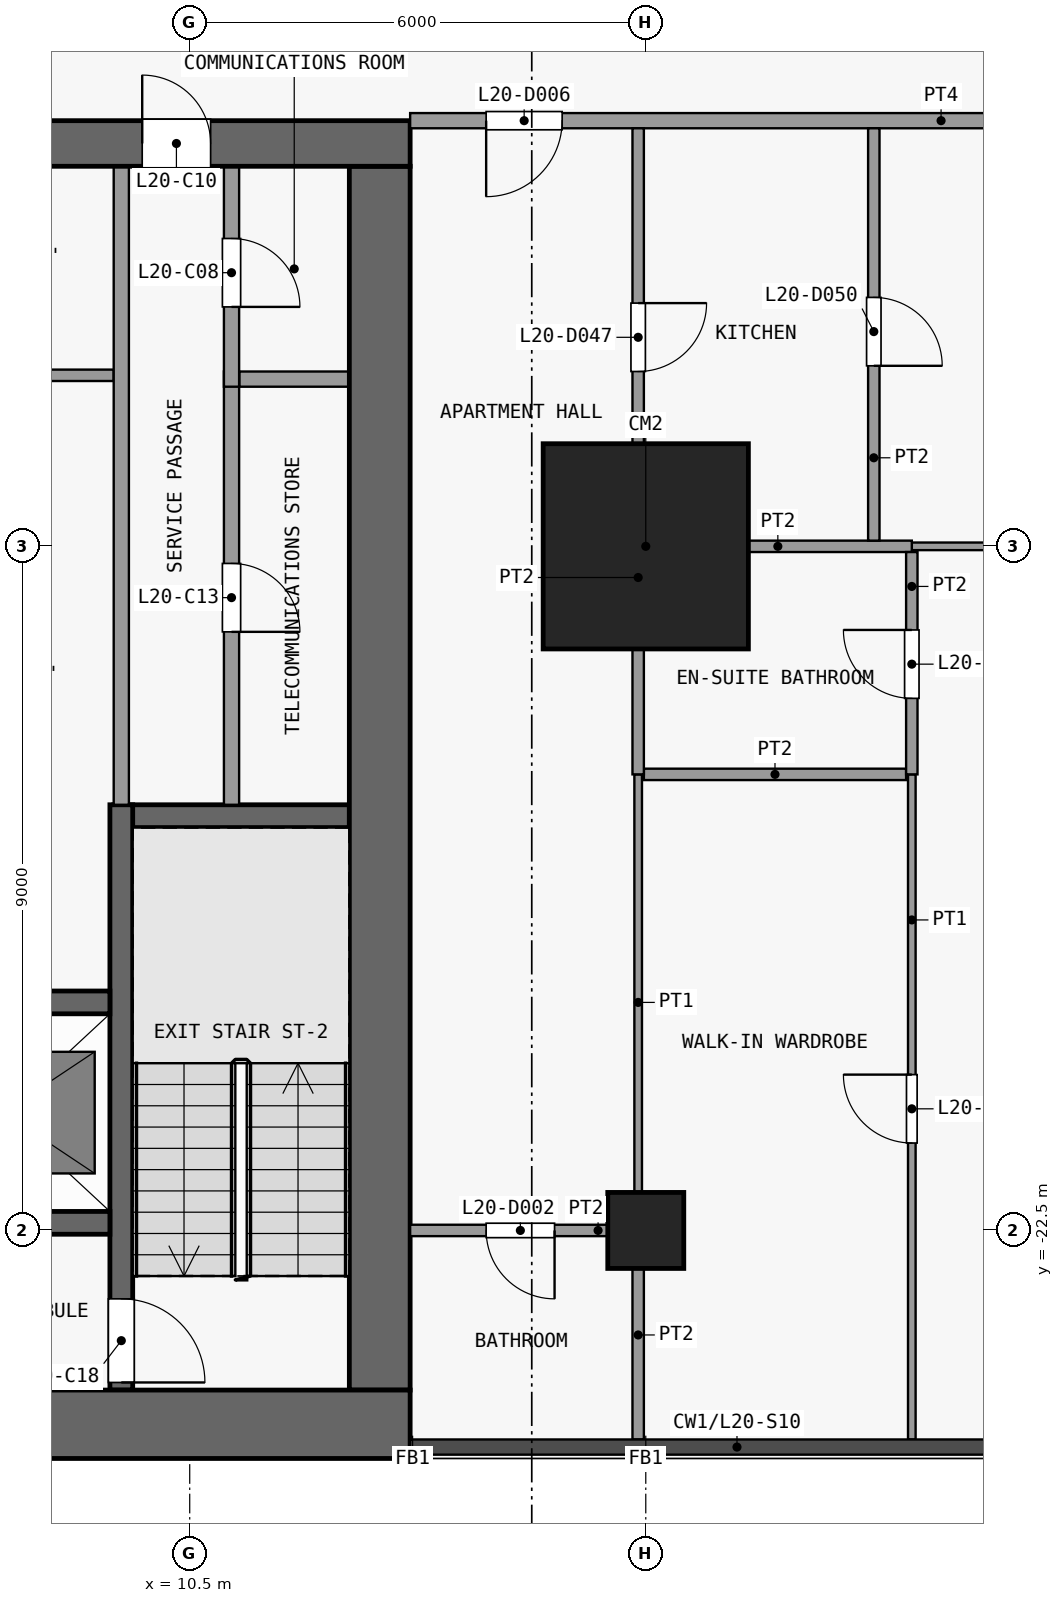
"""IFC4 building model, lengths in metres.
Left out: names, types, materials, properties, quantities, classifications, styles, units other than length and angle.
Written with IfcOpenShell. Run it as: python <this file> out.ifc"""

import sys

from ifc_helpers import new_model, si_unit, direction, frame, frame_2d, origin, origin_2d, place, context, subcontext, project, spatial, rectangle, extrude, element, fill, save


model = new_model("IFC4")
c1 = context("Model", 3, precision=1e-05, world=origin(), true_north=direction((0.0, 1.0)))
c2 = subcontext(c1, "Body", "Model", "MODEL_VIEW")
j1 = project(units=[si_unit("LENGTHUNIT", "METRE"), si_unit("PLANEANGLEUNIT", "RADIAN")], contexts=[c1])
p1 = place(None, origin())
s1 = spatial("IfcSite", under=j1, at=p1, CompositionType="ELEMENT")
p2 = place(p1, origin())
s2 = spatial("IfcBuilding", under=s1, at=p2, CompositionType="ELEMENT")
p3 = place(p2, frame((0.0, 0.0, 84.7)))
s3 = spatial("IfcBuildingStorey", under=s2, at=p3, CompositionType="ELEMENT", Elevation=84.7)
p4 = place(p3, frame((16.5, -22.5, 0.0), z_axis=(0.0, 0.0, 1.0), x_axis=(1.0, 0.0, 0.0)))
e1 = element("IfcColumn", 1, at=p4, inside=s3, PredefinedType="COLUMN", context=c2, shape_type="SweptSolid", body=[
    extrude(rectangle(XDim=1.0, YDim=1.0, at=origin_2d()), origin(), (0.0, 0.0, 1.0), 3.6),
])
p5 = place(p3, frame((16.5, -13.5, 0.0), z_axis=(0.0, 0.0, 1.0), x_axis=(1.0, 0.0, 0.0)))
e2 = element("IfcColumn", 2, at=p5, inside=s3, PredefinedType="COLUMN", context=c2, shape_type="SweptSolid", body=[
    extrude(rectangle(XDim=2.7, YDim=2.7, at=origin_2d()), origin(), (0.0, 0.0, 1.0), 3.6),
])
p6 = place(p3, frame((-13.4, -25.05, 0.0), z_axis=(0.0, 0.0, 1.0), x_axis=(1.0, 0.0, 0.0)))
e3 = element("IfcWall", 3, at=p6, inside=s3, PredefinedType="SHEAR", context=c2, shape_type="SweptSolid", body=[
    extrude(rectangle(XDim=26.8, YDim=0.9, at=frame_2d((13.4, 0.0))), origin(), (0.0, 0.0, 1.0), 3.3),
])
p7 = place(p3, frame((-13.4, -8.2, 0.0), z_axis=(0.0, 0.0, 1.0), x_axis=(1.0, 0.0, 0.0)))
e4 = element("IfcWall", 4, at=p7, inside=s3, PredefinedType="SHEAR", context=c2, shape_type="SweptSolid", body=[
    extrude(rectangle(XDim=26.8, YDim=0.6, at=frame_2d((13.4, 0.0))), origin(), (0.0, 0.0, 1.0), 3.3),
])
p8 = place(p7, frame((7.7, 0.0, 0.0)))
e5 = element("IfcOpeningElement", 5, at=p8, cuts=e4, PredefinedType="OPENING", context=c2, shape_type="SweptSolid", body=[
    extrude(rectangle(XDim=1.8, YDim=2.1, at=frame_2d((0.9, 1.05))), frame((0.0, 0.31, 0.0), z_axis=(0.0, -1.0, 0.0), x_axis=(1.0, 0.0, 0.0)), (0.0, 0.0, 1.0), 0.62),
])
p9 = place(p7, frame((17.3, 0.0, 0.0)))
e6 = element("IfcOpeningElement", 6, at=p9, cuts=e4, PredefinedType="OPENING", context=c2, shape_type="SweptSolid", body=[
    extrude(rectangle(XDim=1.8, YDim=2.1, at=frame_2d((0.9, 1.05))), frame((0.0, 0.31, 0.0), z_axis=(0.0, -1.0, 0.0), x_axis=(1.0, 0.0, 0.0)), (0.0, 0.0, 1.0), 0.62),
])
p10 = place(p7, frame((2.625, 0.0, 0.0)))
e7 = element("IfcOpeningElement", 7, at=p10, cuts=e4, PredefinedType="OPENING", context=c2, shape_type="SweptSolid", body=[
    extrude(rectangle(XDim=0.9, YDim=2.1, at=frame_2d((0.45, 1.05))), frame((0.0, 0.31, 0.0), z_axis=(0.0, -1.0, 0.0), x_axis=(1.0, 0.0, 0.0)), (0.0, 0.0, 1.0), 0.62),
])
p11 = place(p7, frame((23.275, 0.0, 0.0)))
e8 = element("IfcOpeningElement", 8, at=p11, cuts=e4, PredefinedType="OPENING", context=c2, shape_type="SweptSolid", body=[
    extrude(rectangle(XDim=0.9, YDim=2.1, at=frame_2d((0.45, 1.05))), frame((0.0, 0.31, 0.0), z_axis=(0.0, -1.0, 0.0), x_axis=(1.0, 0.0, 0.0)), (0.0, 0.0, 1.0), 0.62),
])
p12 = place(p3, frame((13.0, -24.6, 0.0), z_axis=(0.0, 0.0, 1.0), x_axis=(0.0, 1.0, 0.0)))
e9 = element("IfcWall", 9, at=p12, inside=s3, PredefinedType="SHEAR", context=c2, shape_type="SweptSolid", body=[
    extrude(rectangle(XDim=16.1, YDim=0.8, at=frame_2d((8.05, 0.0))), origin(), (0.0, 0.0, 1.0), 3.3),
])
p13 = place(p3, frame((6.35, -22.4, 0.0), z_axis=(0.0, 0.0, 1.0), x_axis=(1.0, 0.0, 0.0)))
e10 = element("IfcWall", 10, at=p13, inside=s3, PredefinedType="SHEAR", context=c2, shape_type="SweptSolid", body=[
    extrude(rectangle(XDim=3.1, YDim=0.3, at=frame_2d((1.55, 0.0))), origin(), (0.0, 0.0, 1.0), 3.3),
])
p14 = place(p3, frame((6.425, -19.5, 0.0), z_axis=(0.0, 0.0, 1.0), x_axis=(1.0, 0.0, 0.0)))
e11 = element("IfcWall", 11, at=p14, inside=s3, PredefinedType="SHEAR", context=c2, shape_type="SweptSolid", body=[
    extrude(rectangle(XDim=3.025, YDim=0.3, at=frame_2d((1.512, 0.0))), origin(), (0.0, 0.0, 1.0), 3.3),
])
p15 = place(p3, frame((9.5, -17.05, 0.0), z_axis=(0.0, 0.0, 1.0), x_axis=(1.0, 0.0, 0.0)))
e12 = element("IfcWall", 12, at=p15, inside=s3, PredefinedType="SHEAR", context=c2, shape_type="SweptSolid", body=[
    extrude(rectangle(XDim=3.1, YDim=0.3, at=frame_2d((1.55, 0.0))), origin(), (0.0, 0.0, 1.0), 3.3),
])
p16 = place(p3, frame((11.15, -11.3, 0.0), z_axis=(0.0, 0.0, 1.0), x_axis=(1.0, 0.0, 0.0)))
e13 = element("IfcWall", 13, at=p16, inside=s3, PredefinedType="PARTITIONING", context=c2, shape_type="SweptSolid", body=[
    extrude(rectangle(XDim=1.45, YDim=0.2, at=frame_2d((0.725, 0.0))), origin(), (0.0, 0.0, 1.0), 3.3),
])
p17 = place(p3, frame((6.575, -11.25, 0.0), z_axis=(0.0, 0.0, 1.0), x_axis=(1.0, 0.0, 0.0)))
e14 = element("IfcWall", 14, at=p17, inside=s3, PredefinedType="PARTITIONING", context=c2, shape_type="SweptSolid", body=[
    extrude(rectangle(XDim=2.925, YDim=0.15, at=frame_2d((1.462, 0.0))), origin(), (0.0, 0.0, 1.0), 3.3),
])
p18 = place(p3, frame((9.6, -16.9, 0.0), z_axis=(0.0, 0.0, 1.0), x_axis=(0.0, -1.0, 0.0)))
e15 = element("IfcWall", 15, at=p18, inside=s3, PredefinedType="SHEAR", context=c2, shape_type="SweptSolid", body=[
    extrude(rectangle(XDim=7.7, YDim=0.3, at=frame_2d((3.85, 0.0))), origin(), (0.0, 0.0, 1.0), 3.3),
])
p19 = place(p18, frame((6.5, 0.0, 0.0)))
e16 = element("IfcOpeningElement", 16, at=p19, cuts=e15, PredefinedType="OPENING", context=c2, shape_type="SweptSolid", body=[
    extrude(rectangle(XDim=1.1, YDim=2.1, at=frame_2d((0.55, 1.05))), frame((0.0, 0.16, 0.0), z_axis=(0.0, -1.0, 0.0), x_axis=(1.0, 0.0, 0.0)), (0.0, 0.0, 1.0), 0.32),
])
p20 = place(p3, frame((9.6, -16.9, 0.0), z_axis=(0.0, 0.0, 1.0), x_axis=(0.0, 1.0, 0.0)))
e17 = element("IfcWall", 17, at=p20, inside=s3, PredefinedType="PARTITIONING", context=c2, shape_type="SweptSolid", body=[
    extrude(rectangle(XDim=8.4, YDim=0.2, at=frame_2d((4.2, 0.0))), origin(), (0.0, 0.0, 1.0), 3.3),
])
p21 = place(p3, frame((11.05, -11.2, 0.0), z_axis=(0.0, 0.0, 1.0), x_axis=(0.0, -1.0, 0.0)))
e18 = element("IfcWall", 18, at=p21, inside=s3, PredefinedType="PARTITIONING", context=c2, shape_type="SweptSolid", body=[
    extrude(rectangle(XDim=5.7, YDim=0.2, at=frame_2d((2.85, 0.0))), origin(), (0.0, 0.0, 1.0), 3.3),
])
p22 = place(p21, frame((2.525, 0.0, 0.0)))
e19 = element("IfcOpeningElement", 19, at=p22, cuts=e18, PredefinedType="OPENING", context=c2, shape_type="SweptSolid", body=[
    extrude(rectangle(XDim=0.9, YDim=2.1, at=frame_2d((0.45, 1.05))), frame((0.0, 0.11, 0.0), z_axis=(0.0, -1.0, 0.0), x_axis=(1.0, 0.0, 0.0)), (0.0, 0.0, 1.0), 0.22),
])
p23 = place(p3, frame((11.05, -8.5, 0.0), z_axis=(0.0, 0.0, 1.0), x_axis=(0.0, -1.0, 0.0)))
e20 = element("IfcWall", 20, at=p23, inside=s3, PredefinedType="PARTITIONING", context=c2, shape_type="SweptSolid", body=[
    extrude(rectangle(XDim=2.9, YDim=0.2, at=frame_2d((1.45, 0.0))), origin(), (0.0, 0.0, 1.0), 3.3),
])
p24 = place(p23, frame((0.95, 0.0, 0.0)))
e21 = element("IfcOpeningElement", 21, at=p24, cuts=e20, PredefinedType="OPENING", context=c2, shape_type="SweptSolid", body=[
    extrude(rectangle(XDim=0.9, YDim=2.1, at=frame_2d((0.45, 1.05))), frame((0.0, 0.11, 0.0), z_axis=(0.0, -1.0, 0.0), x_axis=(1.0, 0.0, 0.0)), (0.0, 0.0, 1.0), 0.22),
])
p25 = place(p3, frame((13.4, -22.5, 0.0), z_axis=(0.0, 0.0, 1.0), x_axis=(1.0, 0.0, 0.0)))
e22 = element("IfcWall", 22, at=p25, inside=s3, PredefinedType="PARTITIONING", context=c2, shape_type="SweptSolid", body=[
    extrude(rectangle(XDim=2.925, YDim=0.15, at=frame_2d((1.462, 0.0))), origin(), (0.0, 0.0, 1.0), 3.3),
])
p26 = place(p25, frame((1.0, 0.0, 0.0)))
e23 = element("IfcOpeningElement", 23, at=p26, cuts=e22, PredefinedType="OPENING", context=c2, shape_type="SweptSolid", body=[
    extrude(rectangle(XDim=0.9, YDim=2.1, at=frame_2d((0.45, 1.05))), frame((0.0, 0.085, 0.0), z_axis=(0.0, -1.0, 0.0), x_axis=(1.0, 0.0, 0.0)), (0.0, 0.0, 1.0), 0.17),
])
p27 = place(p3, frame((16.475, -16.5, 0.0), z_axis=(0.0, 0.0, 1.0), x_axis=(1.0, 0.0, 0.0)))
e24 = element("IfcWall", 24, at=p27, inside=s3, PredefinedType="PARTITIONING", context=c2, shape_type="SweptSolid", body=[
    extrude(rectangle(XDim=3.45, YDim=0.15, at=frame_2d((1.725, 0.0))), origin(), (0.0, 0.0, 1.0), 3.3),
])
p28 = place(p3, frame((20.0, -13.5, 0.0), z_axis=(0.0, 0.0, 1.0), x_axis=(1.0, 0.0, 0.0)))
e25 = element("IfcWall", 25, at=p28, inside=s3, PredefinedType="PARTITIONING", context=c2, shape_type="SweptSolid", body=[
    extrude(rectangle(XDim=5.25, YDim=0.1, at=frame_2d((2.625, 0.0))), origin(), (0.0, 0.0, 1.0), 3.3),
])
p29 = place(p28, frame((3.1, 0.0, 0.0)))
e26 = element("IfcOpeningElement", 26, at=p29, cuts=e25, PredefinedType="OPENING", context=c2, shape_type="SweptSolid", body=[
    extrude(rectangle(XDim=0.9, YDim=2.1, at=frame_2d((0.45, 1.05))), frame((0.0, 0.06, 0.0), z_axis=(0.0, -1.0, 0.0), x_axis=(1.0, 0.0, 0.0)), (0.0, 0.0, 1.0), 0.12),
])
p30 = place(p3, frame((16.475, -13.5, 0.0), z_axis=(0.0, 0.0, 1.0), x_axis=(1.0, 0.0, 0.0)))
e27 = element("IfcWall", 27, at=p30, inside=s3, PredefinedType="PARTITIONING", context=c2, shape_type="SweptSolid", body=[
    extrude(rectangle(XDim=3.525, YDim=0.15, at=frame_2d((1.762, 0.0))), origin(), (0.0, 0.0, 1.0), 3.3),
])
p31 = place(p3, frame((13.4, -7.9, 0.0), z_axis=(0.0, 0.0, 1.0), x_axis=(1.0, 0.0, 0.0)))
e28 = element("IfcWall", 28, at=p31, inside=s3, PredefinedType="PARTITIONING", context=c2, shape_type="SweptSolid", body=[
    extrude(rectangle(XDim=11.85, YDim=0.2, at=frame_2d((5.925, 0.0))), origin(), (0.0, 0.0, 1.0), 3.3),
])
p32 = place(p31, frame((1.0, 0.0, 0.0)))
e29 = element("IfcOpeningElement", 29, at=p32, cuts=e28, PredefinedType="OPENING", context=c2, shape_type="SweptSolid", body=[
    extrude(rectangle(XDim=1.0, YDim=2.1, at=frame_2d((0.5, 1.05))), frame((0.0, 0.11, 0.0), z_axis=(0.0, -1.0, 0.0), x_axis=(1.0, 0.0, 0.0)), (0.0, 0.0, 1.0), 0.22),
])
p33 = place(p3, frame((16.4, -22.5, 0.0), z_axis=(0.0, 0.0, 1.0), x_axis=(0.0, 1.0, 0.0)))
e30 = element("IfcWall", 30, at=p33, inside=s3, PredefinedType="PARTITIONING", context=c2, shape_type="SweptSolid", body=[
    extrude(rectangle(XDim=6.0, YDim=0.1, at=frame_2d((3.0, 0.0))), origin(), (0.0, 0.0, 1.0), 3.3),
])
p34 = place(p3, frame((16.4, -25.25, 0.0), z_axis=(0.0, 0.0, 1.0), x_axis=(0.0, 1.0, 0.0)))
e31 = element("IfcWall", 31, at=p34, inside=s3, PredefinedType="PARTITIONING", context=c2, shape_type="SweptSolid", body=[
    extrude(rectangle(XDim=2.75, YDim=0.15, at=frame_2d((1.375, 0.0))), origin(), (0.0, 0.0, 1.0), 3.3),
])
p35 = place(p3, frame((16.4, -16.5, 0.0), z_axis=(0.0, 0.0, 1.0), x_axis=(0.0, 1.0, 0.0)))
e32 = element("IfcWall", 32, at=p35, inside=s3, PredefinedType="PARTITIONING", context=c2, shape_type="SweptSolid", body=[
    extrude(rectangle(XDim=8.5, YDim=0.15, at=frame_2d((4.25, 0.0))), origin(), (0.0, 0.0, 1.0), 3.3),
])
p36 = place(p35, frame((5.3, 0.0, 0.0)))
e33 = element("IfcOpeningElement", 33, at=p36, cuts=e32, PredefinedType="OPENING", context=c2, shape_type="SweptSolid", body=[
    extrude(rectangle(XDim=0.9, YDim=2.1, at=frame_2d((0.45, 1.05))), frame((0.0, 0.085, 0.0), z_axis=(0.0, -1.0, 0.0), x_axis=(1.0, 0.0, 0.0)), (0.0, 0.0, 1.0), 0.17),
])
p37 = place(p3, frame((19.5, -13.425, 0.0), z_axis=(0.0, 0.0, 1.0), x_axis=(0.0, 1.0, 0.0)))
e34 = element("IfcWall", 34, at=p37, inside=s3, PredefinedType="PARTITIONING", context=c2, shape_type="SweptSolid", body=[
    extrude(rectangle(XDim=5.425, YDim=0.15, at=frame_2d((2.712, 0.0))), origin(), (0.0, 0.0, 1.0), 3.3),
])
p38 = place(p37, frame((2.3, 0.0, 0.0)))
e35 = element("IfcOpeningElement", 35, at=p38, cuts=e34, PredefinedType="OPENING", context=c2, shape_type="SweptSolid", body=[
    extrude(rectangle(XDim=0.9, YDim=2.1, at=frame_2d((0.45, 1.05))), frame((0.0, 0.085, 0.0), z_axis=(0.0, -1.0, 0.0), x_axis=(1.0, 0.0, 0.0)), (0.0, 0.0, 1.0), 0.17),
])
p39 = place(p3, frame((20.0, -25.25, 0.0), z_axis=(0.0, 0.0, 1.0), x_axis=(0.0, 1.0, 0.0)))
e36 = element("IfcWall", 36, at=p39, inside=s3, PredefinedType="PARTITIONING", context=c2, shape_type="SweptSolid", body=[
    extrude(rectangle(XDim=8.75, YDim=0.1, at=frame_2d((4.375, 0.0))), origin(), (0.0, 0.0, 1.0), 3.3),
])
p40 = place(p39, frame((3.9, 0.0, 0.0)))
e37 = element("IfcOpeningElement", 37, at=p40, cuts=e36, PredefinedType="OPENING", context=c2, shape_type="SweptSolid", body=[
    extrude(rectangle(XDim=0.9, YDim=2.1, at=frame_2d((0.45, 1.05))), frame((0.0, 0.06, 0.0), z_axis=(0.0, -1.0, 0.0), x_axis=(1.0, 0.0, 0.0)), (0.0, 0.0, 1.0), 0.12),
])
p41 = place(p3, frame((20.0, -16.5, 0.0), z_axis=(0.0, 0.0, 1.0), x_axis=(0.0, 1.0, 0.0)))
e38 = element("IfcWall", 38, at=p41, inside=s3, PredefinedType="PARTITIONING", context=c2, shape_type="SweptSolid", body=[
    extrude(rectangle(XDim=2.925, YDim=0.15, at=frame_2d((1.462, 0.0))), origin(), (0.0, 0.0, 1.0), 3.3),
])
p42 = place(p41, frame((1.0, 0.0, 0.0)))
e39 = element("IfcOpeningElement", 39, at=p42, cuts=e38, PredefinedType="OPENING", context=c2, shape_type="SweptSolid", body=[
    extrude(rectangle(XDim=0.9, YDim=2.1, at=frame_2d((0.45, 1.05))), frame((0.0, 0.085, 0.0), z_axis=(0.0, -1.0, 0.0), x_axis=(1.0, 0.0, 0.0)), (0.0, 0.0, 1.0), 0.17),
])
p43 = place(p24, origin())
e40 = element("IfcDoor", 40, at=p43, inside=s3, OperationType="SINGLE_SWING_RIGHT", PredefinedType="DOOR", context=c2, shape_type="SweptSolid", body=[
    extrude(rectangle(XDim=0.9, YDim=2.1, at=frame_2d((0.45, 1.05))), frame((0.0, 0.025, 0.0), z_axis=(0.0, -1.0, 0.0), x_axis=(1.0, 0.0, 0.0)), (0.0, 0.0, 1.0), 0.05),
])
fill(e21, e40)
p44 = place(p11, origin())
e41 = element("IfcDoor", 41, at=p44, inside=s3, OperationType="SINGLE_SWING_LEFT", PredefinedType="DOOR", context=c2, shape_type="SweptSolid", body=[
    extrude(rectangle(XDim=0.9, YDim=2.1, at=frame_2d((0.45, 1.05))), frame((0.0, 0.025, 0.0), z_axis=(0.0, -1.0, 0.0), x_axis=(1.0, 0.0, 0.0)), (0.0, 0.0, 1.0), 0.05),
])
fill(e8, e41)
p45 = place(p22, origin())
e42 = element("IfcDoor", 42, at=p45, inside=s3, OperationType="SINGLE_SWING_RIGHT", PredefinedType="DOOR", context=c2, shape_type="SweptSolid", body=[
    extrude(rectangle(XDim=0.9, YDim=2.1, at=frame_2d((0.45, 1.05))), frame((0.0, 0.025, 0.0), z_axis=(0.0, -1.0, 0.0), x_axis=(1.0, 0.0, 0.0)), (0.0, 0.0, 1.0), 0.05),
])
fill(e19, e42)
p46 = place(p19, origin())
e43 = element("IfcDoor", 43, at=p46, inside=s3, OperationType="SINGLE_SWING_RIGHT", PredefinedType="DOOR", context=c2, shape_type="SweptSolid", body=[
    extrude(rectangle(XDim=1.1, YDim=2.1, at=frame_2d((0.55, 1.05))), frame((0.0, 0.025, 0.0), z_axis=(0.0, -1.0, 0.0), x_axis=(1.0, 0.0, 0.0)), (0.0, 0.0, 1.0), 0.05),
])
fill(e16, e43)
p47 = place(p26, origin())
e44 = element("IfcDoor", 44, at=p47, inside=s3, OperationType="SINGLE_SWING_RIGHT", PredefinedType="DOOR", context=c2, shape_type="SweptSolid", body=[
    extrude(rectangle(XDim=0.9, YDim=2.1, at=frame_2d((0.45, 1.05))), frame((0.0, 0.025, 0.0), z_axis=(0.0, -1.0, 0.0), x_axis=(1.0, 0.0, 0.0)), (0.0, 0.0, 1.0), 0.05),
])
fill(e23, e44)
p48 = place(p32, origin())
e45 = element("IfcDoor", 45, at=p48, inside=s3, OperationType="SINGLE_SWING_LEFT", PredefinedType="DOOR", context=c2, shape_type="SweptSolid", body=[
    extrude(rectangle(XDim=1.0, YDim=2.1, at=frame_2d((0.5, 1.05))), frame((0.0, 0.025, 0.0), z_axis=(0.0, -1.0, 0.0), x_axis=(1.0, 0.0, 0.0)), (0.0, 0.0, 1.0), 0.05),
])
fill(e29, e45)
p49 = place(p36, origin())
e46 = element("IfcDoor", 46, at=p49, inside=s3, OperationType="SINGLE_SWING_RIGHT", PredefinedType="DOOR", context=c2, shape_type="SweptSolid", body=[
    extrude(rectangle(XDim=0.9, YDim=2.1, at=frame_2d((0.45, 1.05))), frame((0.0, 0.025, 0.0), z_axis=(0.0, -1.0, 0.0), x_axis=(1.0, 0.0, 0.0)), (0.0, 0.0, 1.0), 0.05),
])
fill(e33, e46)
p50 = place(p38, origin())
e47 = element("IfcDoor", 47, at=p50, inside=s3, OperationType="SINGLE_SWING_LEFT", PredefinedType="DOOR", context=c2, shape_type="SweptSolid", body=[
    extrude(rectangle(XDim=0.9, YDim=2.1, at=frame_2d((0.45, 1.05))), frame((0.0, 0.025, 0.0), z_axis=(0.0, -1.0, 0.0), x_axis=(1.0, 0.0, 0.0)), (0.0, 0.0, 1.0), 0.05),
])
fill(e35, e47)
p51 = place(p40, origin())
e48 = element("IfcDoor", 48, at=p51, inside=s3, OperationType="SINGLE_SWING_LEFT", PredefinedType="DOOR", context=c2, shape_type="SweptSolid", body=[
    extrude(rectangle(XDim=0.9, YDim=2.1, at=frame_2d((0.45, 1.05))), frame((0.0, 0.025, 0.0), z_axis=(0.0, -1.0, 0.0), x_axis=(1.0, 0.0, 0.0)), (0.0, 0.0, 1.0), 0.05),
])
fill(e37, e48)
p52 = place(p42, origin())
e49 = element("IfcDoor", 49, at=p52, inside=s3, OperationType="SINGLE_SWING_LEFT", PredefinedType="DOOR", context=c2, shape_type="SweptSolid", body=[
    extrude(rectangle(XDim=0.9, YDim=2.1, at=frame_2d((0.45, 1.05))), frame((0.0, 0.025, 0.0), z_axis=(0.0, -1.0, 0.0), x_axis=(1.0, 0.0, 0.0)), (0.0, 0.0, 1.0), 0.05),
])
fill(e39, e49)
save(model, sys.argv[1])
